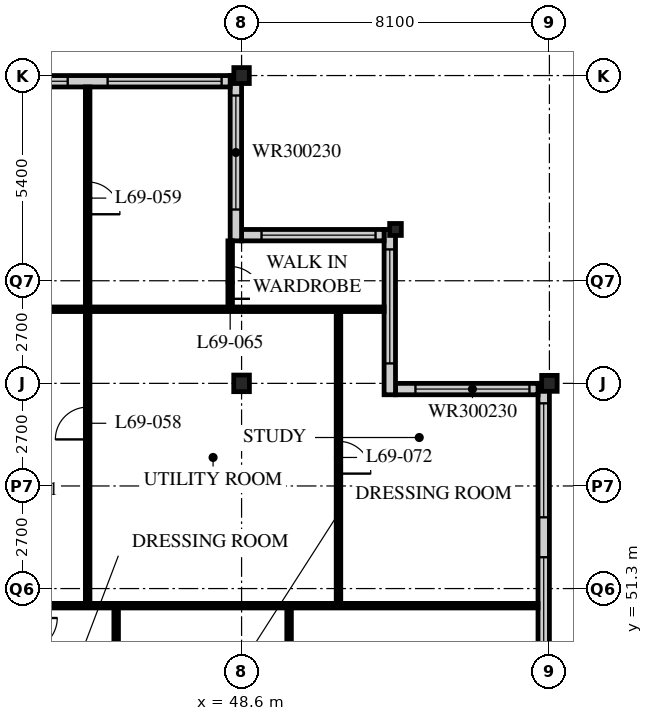
"""IFC4 building model, lengths in metres.
Left out: names, types, materials, properties, quantities, classifications, styles, units other than length and angle.
Written with IfcOpenShell. Run it as: python <this file> out.ifc"""

import sys

from ifc_helpers import new_model, si_unit, direction, frame, frame_2d, origin, origin_2d, place, context, subcontext, project, spatial, rectangle, i_section, extrude, element, fill, save


model = new_model("IFC4")
c1 = context("Model", 3, precision=1e-05, world=origin(), true_north=direction((0.0, 1.0)))
c2 = subcontext(c1, "Body", "Model", "MODEL_VIEW")
j1 = project(units=[si_unit("LENGTHUNIT", "METRE"), si_unit("PLANEANGLEUNIT", "RADIAN")], contexts=[c1])
p1 = place(None, origin())
s1 = spatial("IfcSite", under=j1, at=p1, CompositionType="ELEMENT")
p2 = place(p1, origin())
s2 = spatial("IfcBuilding", under=s1, at=p2, CompositionType="ELEMENT")
p3 = place(p2, frame((0.0, 0.0, 269.7)))
s3 = spatial("IfcBuildingStorey", under=s2, at=p3, CompositionType="ELEMENT", Elevation=269.7)
p4 = place(p3, frame((48.6, 56.7, 0.0), z_axis=(0.0, 0.0, 1.0), x_axis=(1.0, 0.0, 0.0)))
e1 = element("IfcColumn", 1, at=p4, inside=s3, PredefinedType="COLUMN", context=c2, shape_type="SweptSolid", body=[
    extrude(i_section(OverallWidth=0.412, OverallDepth=0.437, WebThickness=0.036, FlangeThickness=0.058, FilletRadius=0.015, at=origin_2d()), origin(), (0.0, 0.0, 1.0), 3.9),
])
p5 = place(p3, frame((48.6, 64.8, 0.0), z_axis=(0.0, 0.0, 1.0), x_axis=(1.0, 0.0, 0.0)))
e2 = element("IfcColumn", 2, at=p5, inside=s3, PredefinedType="COLUMN", context=c2, shape_type="SweptSolid", body=[
    extrude(i_section(OverallWidth=0.407, OverallDepth=0.419, WebThickness=0.031, FlangeThickness=0.049, FilletRadius=0.015, at=origin_2d()), origin(), (0.0, 0.0, 1.0), 3.9),
])
p6 = place(p3, frame((52.65, 60.75, 0.0), z_axis=(0.0, 0.0, 1.0), x_axis=(1.0, 0.0, 0.0)))
e3 = element("IfcColumn", 3, at=p6, inside=s3, PredefinedType="COLUMN", context=c2, shape_type="SweptSolid", body=[
    extrude(i_section(OverallWidth=0.307, OverallDepth=0.314, WebThickness=0.012, FlangeThickness=0.019, FilletRadius=0.015, at=origin_2d()), origin(), (0.0, 0.0, 1.0), 3.9),
])
p7 = place(p3, frame((56.7, 56.7, 0.0), z_axis=(0.0, 0.0, 1.0), x_axis=(1.0, 0.0, 0.0)))
e4 = element("IfcColumn", 4, at=p7, inside=s3, PredefinedType="COLUMN", context=c2, shape_type="SweptSolid", body=[
    extrude(i_section(OverallWidth=0.407, OverallDepth=0.419, WebThickness=0.031, FlangeThickness=0.049, FilletRadius=0.015, at=origin_2d()), origin(), (0.0, 0.0, 1.0), 3.9),
])
p8 = place(p3, frame((56.55, 24.6, 0.0), z_axis=(0.0, 0.0, 1.0), x_axis=(0.0, 1.0, 0.0)))
e5 = element("IfcWall", 5, at=p8, inside=s3, PredefinedType="SOLIDWALL", context=c2, shape_type="SweptSolid", body=[
    extrude(rectangle(XDim=32.1, YDim=0.3, at=frame_2d((16.05, 0.0))), origin(), (0.0, 0.0, 1.0), 3.69),
])
p9 = place(p8, frame((0.225, 0.0, 0.6)))
e6 = element("IfcOpeningElement", 6, at=p9, cuts=e5, PredefinedType="OPENING", context=c2, shape_type="SweptSolid", body=[
    extrude(rectangle(XDim=3.0, YDim=2.4, at=frame_2d((1.5, 1.2))), frame((0.0, 0.16, 0.0), z_axis=(0.0, -1.0, 0.0), x_axis=(1.0, 0.0, 0.0)), (0.0, 0.0, 1.0), 0.32),
])
p10 = place(p8, frame((4.275, 0.0, 0.6)))
e7 = element("IfcOpeningElement", 7, at=p10, cuts=e5, PredefinedType="OPENING", context=c2, shape_type="SweptSolid", body=[
    extrude(rectangle(XDim=3.0, YDim=2.4, at=frame_2d((1.5, 1.2))), frame((0.0, 0.16, 0.0), z_axis=(0.0, -1.0, 0.0), x_axis=(1.0, 0.0, 0.0)), (0.0, 0.0, 1.0), 0.32),
])
p11 = place(p8, frame((8.325, 0.0, 0.6)))
e8 = element("IfcOpeningElement", 8, at=p11, cuts=e5, PredefinedType="OPENING", context=c2, shape_type="SweptSolid", body=[
    extrude(rectangle(XDim=3.0, YDim=2.4, at=frame_2d((1.5, 1.2))), frame((0.0, 0.16, 0.0), z_axis=(0.0, -1.0, 0.0), x_axis=(1.0, 0.0, 0.0)), (0.0, 0.0, 1.0), 0.32),
])
p12 = place(p8, frame((12.375, 0.0, 0.6)))
e9 = element("IfcOpeningElement", 9, at=p12, cuts=e5, PredefinedType="OPENING", context=c2, shape_type="SweptSolid", body=[
    extrude(rectangle(XDim=3.0, YDim=2.4, at=frame_2d((1.5, 1.2))), frame((0.0, 0.16, 0.0), z_axis=(0.0, -1.0, 0.0), x_axis=(1.0, 0.0, 0.0)), (0.0, 0.0, 1.0), 0.32),
])
p13 = place(p8, frame((16.425, 0.0, 0.6)))
e10 = element("IfcOpeningElement", 10, at=p13, cuts=e5, PredefinedType="OPENING", context=c2, shape_type="SweptSolid", body=[
    extrude(rectangle(XDim=3.0, YDim=2.4, at=frame_2d((1.5, 1.2))), frame((0.0, 0.16, 0.0), z_axis=(0.0, -1.0, 0.0), x_axis=(1.0, 0.0, 0.0)), (0.0, 0.0, 1.0), 0.32),
])
p14 = place(p8, frame((20.475, 0.0, 0.6)))
e11 = element("IfcOpeningElement", 11, at=p14, cuts=e5, PredefinedType="OPENING", context=c2, shape_type="SweptSolid", body=[
    extrude(rectangle(XDim=3.0, YDim=2.4, at=frame_2d((1.5, 1.2))), frame((0.0, 0.16, 0.0), z_axis=(0.0, -1.0, 0.0), x_axis=(1.0, 0.0, 0.0)), (0.0, 0.0, 1.0), 0.32),
])
p15 = place(p8, frame((24.525, 0.0, 0.6)))
e12 = element("IfcOpeningElement", 12, at=p15, cuts=e5, PredefinedType="OPENING", context=c2, shape_type="SweptSolid", body=[
    extrude(rectangle(XDim=3.0, YDim=2.4, at=frame_2d((1.5, 1.2))), frame((0.0, 0.16, 0.0), z_axis=(0.0, -1.0, 0.0), x_axis=(1.0, 0.0, 0.0)), (0.0, 0.0, 1.0), 0.32),
])
p16 = place(p8, frame((28.575, 0.0, 0.6)))
e13 = element("IfcOpeningElement", 13, at=p16, cuts=e5, PredefinedType="OPENING", context=c2, shape_type="SweptSolid", body=[
    extrude(rectangle(XDim=3.0, YDim=2.4, at=frame_2d((1.5, 1.2))), frame((0.0, 0.16, 0.0), z_axis=(0.0, -1.0, 0.0), x_axis=(1.0, 0.0, 0.0)), (0.0, 0.0, 1.0), 0.32),
])
p17 = place(p3, frame((56.4, 56.55, 0.0), z_axis=(0.0, 0.0, 1.0), x_axis=(-1.0, 0.0, 0.0)))
e14 = element("IfcWall", 14, at=p17, inside=s3, PredefinedType="SOLIDWALL", context=c2, shape_type="SweptSolid", body=[
    extrude(rectangle(XDim=3.75, YDim=0.3, at=frame_2d((1.875, 0.0))), origin(), (0.0, 0.0, 1.0), 3.69),
])
p18 = place(p17, frame((0.225, 0.0, 0.6)))
e15 = element("IfcOpeningElement", 15, at=p18, cuts=e14, PredefinedType="OPENING", context=c2, shape_type="SweptSolid", body=[
    extrude(rectangle(XDim=3.0, YDim=2.3, at=frame_2d((1.5, 1.15))), frame((0.0, 0.16, 0.0), z_axis=(0.0, -1.0, 0.0), x_axis=(1.0, 0.0, 0.0)), (0.0, 0.0, 1.0), 0.32),
])
p19 = place(p3, frame((52.5, 56.4, 0.0), z_axis=(0.0, 0.0, 1.0), x_axis=(0.0, 1.0, 0.0)))
e16 = element("IfcWall", 16, at=p19, inside=s3, PredefinedType="SOLIDWALL", context=c2, shape_type="SweptSolid", body=[
    extrude(rectangle(XDim=4.35, YDim=0.3, at=frame_2d((2.175, 0.0))), origin(), (0.0, 0.0, 1.0), 3.69),
])
p20 = place(p19, frame((0.825, 0.0, 0.6)))
e17 = element("IfcOpeningElement", 17, at=p20, cuts=e16, PredefinedType="OPENING", context=c2, shape_type="SweptSolid", body=[
    extrude(rectangle(XDim=3.0, YDim=2.3, at=frame_2d((1.5, 1.15))), frame((0.0, 0.16, 0.0), z_axis=(0.0, -1.0, 0.0), x_axis=(1.0, 0.0, 0.0)), (0.0, 0.0, 1.0), 0.32),
])
p21 = place(p3, frame((52.35, 60.6, 0.0), z_axis=(0.0, 0.0, 1.0), x_axis=(-1.0, 0.0, 0.0)))
e18 = element("IfcWall", 18, at=p21, inside=s3, PredefinedType="SOLIDWALL", context=c2, shape_type="SweptSolid", body=[
    extrude(rectangle(XDim=3.75, YDim=0.3, at=frame_2d((1.875, 0.0))), origin(), (0.0, 0.0, 1.0), 3.69),
])
p22 = place(p21, frame((0.225, 0.0, 0.6)))
e19 = element("IfcOpeningElement", 19, at=p22, cuts=e18, PredefinedType="OPENING", context=c2, shape_type="SweptSolid", body=[
    extrude(rectangle(XDim=3.0, YDim=2.3, at=frame_2d((1.5, 1.15))), frame((0.0, 0.16, 0.0), z_axis=(0.0, -1.0, 0.0), x_axis=(1.0, 0.0, 0.0)), (0.0, 0.0, 1.0), 0.32),
])
p23 = place(p3, frame((48.45, 60.45, 0.0), z_axis=(0.0, 0.0, 1.0), x_axis=(0.0, 1.0, 0.0)))
e20 = element("IfcWall", 20, at=p23, inside=s3, PredefinedType="SOLIDWALL", context=c2, shape_type="SweptSolid", body=[
    extrude(rectangle(XDim=4.35, YDim=0.3, at=frame_2d((2.175, 0.0))), origin(), (0.0, 0.0, 1.0), 3.69),
])
p24 = place(p23, frame((0.825, 0.0, 0.6)))
e21 = element("IfcOpeningElement", 21, at=p24, cuts=e20, PredefinedType="OPENING", context=c2, shape_type="SweptSolid", body=[
    extrude(rectangle(XDim=3.0, YDim=2.3, at=frame_2d((1.5, 1.15))), frame((0.0, 0.16, 0.0), z_axis=(0.0, -1.0, 0.0), x_axis=(1.0, 0.0, 0.0)), (0.0, 0.0, 1.0), 0.32),
])
p25 = place(p3, frame((48.3, 64.65, 0.0), z_axis=(0.0, 0.0, 1.0), x_axis=(-1.0, 0.0, 0.0)))
e22 = element("IfcWall", 22, at=p25, inside=s3, PredefinedType="SOLIDWALL", context=c2, shape_type="SweptSolid", body=[
    extrude(rectangle(XDim=40.2, YDim=0.3, at=frame_2d((20.1, 0.0))), origin(), (0.0, 0.0, 1.0), 3.69),
])
p26 = place(p25, frame((0.225, 0.0, 0.6)))
e23 = element("IfcOpeningElement", 23, at=p26, cuts=e22, PredefinedType="OPENING", context=c2, shape_type="SweptSolid", body=[
    extrude(rectangle(XDim=3.0, YDim=2.4, at=frame_2d((1.5, 1.2))), frame((0.0, 0.16, 0.0), z_axis=(0.0, -1.0, 0.0), x_axis=(1.0, 0.0, 0.0)), (0.0, 0.0, 1.0), 0.32),
])
p27 = place(p25, frame((4.275, 0.0, 0.6)))
e24 = element("IfcOpeningElement", 24, at=p27, cuts=e22, PredefinedType="OPENING", context=c2, shape_type="SweptSolid", body=[
    extrude(rectangle(XDim=3.0, YDim=2.4, at=frame_2d((1.5, 1.2))), frame((0.0, 0.16, 0.0), z_axis=(0.0, -1.0, 0.0), x_axis=(1.0, 0.0, 0.0)), (0.0, 0.0, 1.0), 0.32),
])
p28 = place(p25, frame((8.325, 0.0, 0.6)))
e25 = element("IfcOpeningElement", 25, at=p28, cuts=e22, PredefinedType="OPENING", context=c2, shape_type="SweptSolid", body=[
    extrude(rectangle(XDim=3.0, YDim=2.4, at=frame_2d((1.5, 1.2))), frame((0.0, 0.16, 0.0), z_axis=(0.0, -1.0, 0.0), x_axis=(1.0, 0.0, 0.0)), (0.0, 0.0, 1.0), 0.32),
])
p29 = place(p25, frame((12.375, 0.0, 0.6)))
e26 = element("IfcOpeningElement", 26, at=p29, cuts=e22, PredefinedType="OPENING", context=c2, shape_type="SweptSolid", body=[
    extrude(rectangle(XDim=3.0, YDim=2.4, at=frame_2d((1.5, 1.2))), frame((0.0, 0.16, 0.0), z_axis=(0.0, -1.0, 0.0), x_axis=(1.0, 0.0, 0.0)), (0.0, 0.0, 1.0), 0.32),
])
p30 = place(p25, frame((16.425, 0.0, 0.6)))
e27 = element("IfcOpeningElement", 27, at=p30, cuts=e22, PredefinedType="OPENING", context=c2, shape_type="SweptSolid", body=[
    extrude(rectangle(XDim=3.0, YDim=2.4, at=frame_2d((1.5, 1.2))), frame((0.0, 0.16, 0.0), z_axis=(0.0, -1.0, 0.0), x_axis=(1.0, 0.0, 0.0)), (0.0, 0.0, 1.0), 0.32),
])
p31 = place(p25, frame((20.475, 0.0, 0.6)))
e28 = element("IfcOpeningElement", 28, at=p31, cuts=e22, PredefinedType="OPENING", context=c2, shape_type="SweptSolid", body=[
    extrude(rectangle(XDim=3.0, YDim=2.4, at=frame_2d((1.5, 1.2))), frame((0.0, 0.16, 0.0), z_axis=(0.0, -1.0, 0.0), x_axis=(1.0, 0.0, 0.0)), (0.0, 0.0, 1.0), 0.32),
])
p32 = place(p25, frame((24.525, 0.0, 0.6)))
e29 = element("IfcOpeningElement", 29, at=p32, cuts=e22, PredefinedType="OPENING", context=c2, shape_type="SweptSolid", body=[
    extrude(rectangle(XDim=3.0, YDim=2.4, at=frame_2d((1.5, 1.2))), frame((0.0, 0.16, 0.0), z_axis=(0.0, -1.0, 0.0), x_axis=(1.0, 0.0, 0.0)), (0.0, 0.0, 1.0), 0.32),
])
p33 = place(p25, frame((28.575, 0.0, 0.6)))
e30 = element("IfcOpeningElement", 30, at=p33, cuts=e22, PredefinedType="OPENING", context=c2, shape_type="SweptSolid", body=[
    extrude(rectangle(XDim=3.0, YDim=2.4, at=frame_2d((1.5, 1.2))), frame((0.0, 0.16, 0.0), z_axis=(0.0, -1.0, 0.0), x_axis=(1.0, 0.0, 0.0)), (0.0, 0.0, 1.0), 0.32),
])
p34 = place(p25, frame((32.625, 0.0, 0.6)))
e31 = element("IfcOpeningElement", 31, at=p34, cuts=e22, PredefinedType="OPENING", context=c2, shape_type="SweptSolid", body=[
    extrude(rectangle(XDim=3.0, YDim=2.4, at=frame_2d((1.5, 1.2))), frame((0.0, 0.16, 0.0), z_axis=(0.0, -1.0, 0.0), x_axis=(1.0, 0.0, 0.0)), (0.0, 0.0, 1.0), 0.32),
])
p35 = place(p25, frame((36.675, 0.0, 0.6)))
e32 = element("IfcOpeningElement", 32, at=p35, cuts=e22, PredefinedType="OPENING", context=c2, shape_type="SweptSolid", body=[
    extrude(rectangle(XDim=3.0, YDim=2.4, at=frame_2d((1.5, 1.2))), frame((0.0, 0.16, 0.0), z_axis=(0.0, -1.0, 0.0), x_axis=(1.0, 0.0, 0.0)), (0.0, 0.0, 1.0), 0.32),
])
p36 = place(p3, frame((42.9, 50.85, 0.0), z_axis=(0.0, 0.0, 1.0), x_axis=(1.0, 0.0, 0.0)))
e33 = element("IfcWall", 33, at=p36, inside=s3, PredefinedType="PARTITIONING", context=c2, shape_type="SweptSolid", body=[
    extrude(rectangle(XDim=13.5, YDim=0.12, at=frame_2d((6.75, 0.0))), origin(), (0.0, 0.0, 1.0), 3.69),
])
p37 = place(p3, frame((36.45, 58.65, 0.0), z_axis=(0.0, 0.0, 1.0), x_axis=(1.0, 0.0, 0.0)))
e34 = element("IfcWall", 34, at=p37, inside=s3, PredefinedType="PARTITIONING", context=c2, shape_type="SweptSolid", body=[
    extrude(rectangle(XDim=15.9, YDim=0.12, at=frame_2d((7.95, 0.0))), origin(), (0.0, 0.0, 1.0), 3.69),
])
p38 = place(p37, frame((1.675, 0.0, 0.0)))
e35 = element("IfcOpeningElement", 35, at=p38, cuts=e34, PredefinedType="OPENING", context=c2, shape_type="SweptSolid", body=[
    extrude(rectangle(XDim=0.85, YDim=2.1, at=frame_2d((0.425, 1.05))), frame((0.0, 0.07, 0.0), z_axis=(0.0, -1.0, 0.0), x_axis=(1.0, 0.0, 0.0)), (0.0, 0.0, 1.0), 0.14),
])
p39 = place(p3, frame((44.55, 64.5, 0.0), z_axis=(0.0, 0.0, 1.0), x_axis=(0.0, -1.0, 0.0)))
e36 = element("IfcWall", 36, at=p39, inside=s3, PredefinedType="PARTITIONING", context=c2, shape_type="SweptSolid", body=[
    extrude(rectangle(XDim=13.65, YDim=0.12, at=frame_2d((6.825, 0.0))), origin(), (0.0, 0.0, 1.0), 3.69),
])
p40 = place(p39, frame((8.425, 0.0, 0.0)))
e37 = element("IfcOpeningElement", 37, at=p40, cuts=e36, PredefinedType="OPENING", context=c2, shape_type="SweptSolid", body=[
    extrude(rectangle(XDim=0.85, YDim=2.1, at=frame_2d((0.425, 1.05))), frame((0.0, 0.07, 0.0), z_axis=(0.0, -1.0, 0.0), x_axis=(1.0, 0.0, 0.0)), (0.0, 0.0, 1.0), 0.14),
])
p41 = place(p39, frame((2.5, 0.0, 0.0)))
e38 = element("IfcOpeningElement", 38, at=p41, cuts=e36, PredefinedType="OPENING", context=c2, shape_type="SweptSolid", body=[
    extrude(rectangle(XDim=0.85, YDim=2.1, at=frame_2d((0.425, 1.05))), frame((0.0, 0.07, 0.0), z_axis=(0.0, -1.0, 0.0), x_axis=(1.0, 0.0, 0.0)), (0.0, 0.0, 1.0), 0.14),
])
p42 = place(p3, frame((48.3, 58.65, 0.0), z_axis=(0.0, 0.0, 1.0), x_axis=(0.0, 1.0, 0.0)))
e39 = element("IfcWall", 39, at=p42, inside=s3, PredefinedType="PARTITIONING", context=c2, shape_type="SweptSolid", body=[
    extrude(rectangle(XDim=1.8, YDim=0.12, at=frame_2d((0.9, 0.0))), origin(), (0.0, 0.0, 1.0), 3.69),
])
p43 = place(p42, frame((0.275, 0.0, 0.0)))
e40 = element("IfcOpeningElement", 40, at=p43, cuts=e39, PredefinedType="OPENING", context=c2, shape_type="SweptSolid", body=[
    extrude(rectangle(XDim=0.85, YDim=2.1, at=frame_2d((0.425, 1.05))), frame((0.0, 0.07, 0.0), z_axis=(0.0, -1.0, 0.0), x_axis=(1.0, 0.0, 0.0)), (0.0, 0.0, 1.0), 0.14),
])
p44 = place(p3, frame((45.3, 50.85, 0.0), z_axis=(0.0, 0.0, 1.0), x_axis=(0.0, -1.0, 0.0)))
e41 = element("IfcWall", 41, at=p44, inside=s3, PredefinedType="PARTITIONING", context=c2, shape_type="SweptSolid", body=[
    extrude(rectangle(XDim=4.01, YDim=0.12, at=frame_2d((2.005, 0.0))), origin(), (0.0, 0.0, 1.0), 3.69),
])
p45 = place(p44, frame((2.885, 0.0, 0.0)))
e42 = element("IfcOpeningElement", 42, at=p45, cuts=e41, PredefinedType="OPENING", context=c2, shape_type="SweptSolid", body=[
    extrude(rectangle(XDim=0.85, YDim=2.1, at=frame_2d((0.425, 1.05))), frame((0.0, 0.07, 0.0), z_axis=(0.0, -1.0, 0.0), x_axis=(1.0, 0.0, 0.0)), (0.0, 0.0, 1.0), 0.14),
])
p46 = place(p3, frame((51.15, 50.85, 0.0), z_axis=(0.0, 0.0, 1.0), x_axis=(0.0, 1.0, 0.0)))
e43 = element("IfcWall", 43, at=p46, inside=s3, PredefinedType="PARTITIONING", context=c2, shape_type="SweptSolid", body=[
    extrude(rectangle(XDim=7.8, YDim=0.12, at=frame_2d((3.9, 0.0))), origin(), (0.0, 0.0, 1.0), 3.69),
])
p47 = place(p46, frame((3.475, 0.0, 0.0)))
e44 = element("IfcOpeningElement", 44, at=p47, cuts=e43, PredefinedType="OPENING", context=c2, shape_type="SweptSolid", body=[
    extrude(rectangle(XDim=0.85, YDim=2.1, at=frame_2d((0.425, 1.05))), frame((0.0, 0.07, 0.0), z_axis=(0.0, -1.0, 0.0), x_axis=(1.0, 0.0, 0.0)), (0.0, 0.0, 1.0), 0.14),
])
p48 = place(p3, frame((49.85, 44.55, 0.0), z_axis=(0.0, 0.0, 1.0), x_axis=(0.0, 1.0, 0.0)))
e45 = element("IfcWall", 45, at=p48, inside=s3, PredefinedType="PARTITIONING", context=c2, shape_type="SweptSolid", body=[
    extrude(rectangle(XDim=6.3, YDim=0.12, at=frame_2d((3.15, 0.0))), origin(), (0.0, 0.0, 1.0), 3.69),
])
p49 = place(p48, frame((2.725, 0.0, 0.0)))
e46 = element("IfcOpeningElement", 46, at=p49, cuts=e45, PredefinedType="OPENING", context=c2, shape_type="SweptSolid", body=[
    extrude(rectangle(XDim=0.85, YDim=2.1, at=frame_2d((0.425, 1.05))), frame((0.0, 0.07, 0.0), z_axis=(0.0, -1.0, 0.0), x_axis=(1.0, 0.0, 0.0)), (0.0, 0.0, 1.0), 0.14),
])
p50 = place(p15, origin())
e47 = element("IfcWindow", 47, at=p50, inside=s3, PartitioningType="SINGLE_PANEL", PredefinedType="WINDOW", context=c2, shape_type="SweptSolid", body=[
    extrude(rectangle(XDim=3.0, YDim=2.4, at=frame_2d((1.5, 1.2))), frame((0.0, 0.03, 0.0), z_axis=(0.0, -1.0, 0.0), x_axis=(1.0, 0.0, 0.0)), (0.0, 0.0, 1.0), 0.06),
])
fill(e12, e47)
p51 = place(p16, origin())
e48 = element("IfcWindow", 48, at=p51, inside=s3, PartitioningType="SINGLE_PANEL", PredefinedType="WINDOW", context=c2, shape_type="SweptSolid", body=[
    extrude(rectangle(XDim=3.0, YDim=2.4, at=frame_2d((1.5, 1.2))), frame((0.0, 0.03, 0.0), z_axis=(0.0, -1.0, 0.0), x_axis=(1.0, 0.0, 0.0)), (0.0, 0.0, 1.0), 0.06),
])
fill(e13, e48)
p52 = place(p18, origin())
e49 = element("IfcWindow", 49, at=p52, inside=s3, PartitioningType="SINGLE_PANEL", PredefinedType="WINDOW", context=c2, shape_type="SweptSolid", body=[
    extrude(rectangle(XDim=3.0, YDim=2.3, at=frame_2d((1.5, 1.15))), frame((0.0, 0.03, 0.0), z_axis=(0.0, -1.0, 0.0), x_axis=(1.0, 0.0, 0.0)), (0.0, 0.0, 1.0), 0.06),
])
fill(e15, e49)
p53 = place(p20, origin())
e50 = element("IfcWindow", 50, at=p53, inside=s3, PartitioningType="SINGLE_PANEL", PredefinedType="WINDOW", context=c2, shape_type="SweptSolid", body=[
    extrude(rectangle(XDim=3.0, YDim=2.3, at=frame_2d((1.5, 1.15))), frame((0.0, 0.03, 0.0), z_axis=(0.0, -1.0, 0.0), x_axis=(1.0, 0.0, 0.0)), (0.0, 0.0, 1.0), 0.06),
])
fill(e17, e50)
p54 = place(p22, origin())
e51 = element("IfcWindow", 51, at=p54, inside=s3, PartitioningType="SINGLE_PANEL", PredefinedType="WINDOW", context=c2, shape_type="SweptSolid", body=[
    extrude(rectangle(XDim=3.0, YDim=2.3, at=frame_2d((1.5, 1.15))), frame((0.0, 0.03, 0.0), z_axis=(0.0, -1.0, 0.0), x_axis=(1.0, 0.0, 0.0)), (0.0, 0.0, 1.0), 0.06),
])
fill(e19, e51)
p55 = place(p24, origin())
e52 = element("IfcWindow", 52, at=p55, inside=s3, PartitioningType="SINGLE_PANEL", PredefinedType="WINDOW", context=c2, shape_type="SweptSolid", body=[
    extrude(rectangle(XDim=3.0, YDim=2.3, at=frame_2d((1.5, 1.15))), frame((0.0, 0.03, 0.0), z_axis=(0.0, -1.0, 0.0), x_axis=(1.0, 0.0, 0.0)), (0.0, 0.0, 1.0), 0.06),
])
fill(e21, e52)
p56 = place(p26, origin())
e53 = element("IfcWindow", 53, at=p56, inside=s3, PartitioningType="SINGLE_PANEL", PredefinedType="WINDOW", context=c2, shape_type="SweptSolid", body=[
    extrude(rectangle(XDim=3.0, YDim=2.4, at=frame_2d((1.5, 1.2))), frame((0.0, 0.03, 0.0), z_axis=(0.0, -1.0, 0.0), x_axis=(1.0, 0.0, 0.0)), (0.0, 0.0, 1.0), 0.06),
])
fill(e23, e53)
p57 = place(p27, origin())
e54 = element("IfcWindow", 54, at=p57, inside=s3, PartitioningType="SINGLE_PANEL", PredefinedType="WINDOW", context=c2, shape_type="SweptSolid", body=[
    extrude(rectangle(XDim=3.0, YDim=2.4, at=frame_2d((1.5, 1.2))), frame((0.0, 0.03, 0.0), z_axis=(0.0, -1.0, 0.0), x_axis=(1.0, 0.0, 0.0)), (0.0, 0.0, 1.0), 0.06),
])
fill(e24, e54)
p58 = place(p40, origin())
e55 = element("IfcDoor", 55, at=p58, inside=s3, OperationType="SINGLE_SWING_LEFT", PredefinedType="DOOR", context=c2, shape_type="SweptSolid", body=[
    extrude(rectangle(XDim=0.85, YDim=2.1, at=frame_2d((0.425, 1.05))), frame((0.0, 0.025, 0.0), z_axis=(0.0, -1.0, 0.0), x_axis=(1.0, 0.0, 0.0)), (0.0, 0.0, 1.0), 0.05),
])
fill(e37, e55)
p59 = place(p41, origin())
e56 = element("IfcDoor", 56, at=p59, inside=s3, OperationType="SINGLE_SWING_RIGHT", PredefinedType="DOOR", context=c2, shape_type="SweptSolid", body=[
    extrude(rectangle(XDim=0.85, YDim=2.1, at=frame_2d((0.425, 1.05))), frame((0.0, 0.025, 0.0), z_axis=(0.0, -1.0, 0.0), x_axis=(1.0, 0.0, 0.0)), (0.0, 0.0, 1.0), 0.05),
])
fill(e38, e56)
p60 = place(p43, origin())
e57 = element("IfcDoor", 57, at=p60, inside=s3, OperationType="SINGLE_SWING_RIGHT", PredefinedType="DOOR", context=c2, shape_type="SweptSolid", body=[
    extrude(rectangle(XDim=0.85, YDim=2.1, at=frame_2d((0.425, 1.05))), frame((0.0, 0.025, 0.0), z_axis=(0.0, -1.0, 0.0), x_axis=(1.0, 0.0, 0.0)), (0.0, 0.0, 1.0), 0.05),
])
fill(e40, e57)
p61 = place(p47, origin())
e58 = element("IfcDoor", 58, at=p61, inside=s3, OperationType="SINGLE_SWING_RIGHT", PredefinedType="DOOR", context=c2, shape_type="SweptSolid", body=[
    extrude(rectangle(XDim=0.85, YDim=2.1, at=frame_2d((0.425, 1.05))), frame((0.0, 0.025, 0.0), z_axis=(0.0, -1.0, 0.0), x_axis=(1.0, 0.0, 0.0)), (0.0, 0.0, 1.0), 0.05),
])
fill(e44, e58)
save(model, sys.argv[1])
